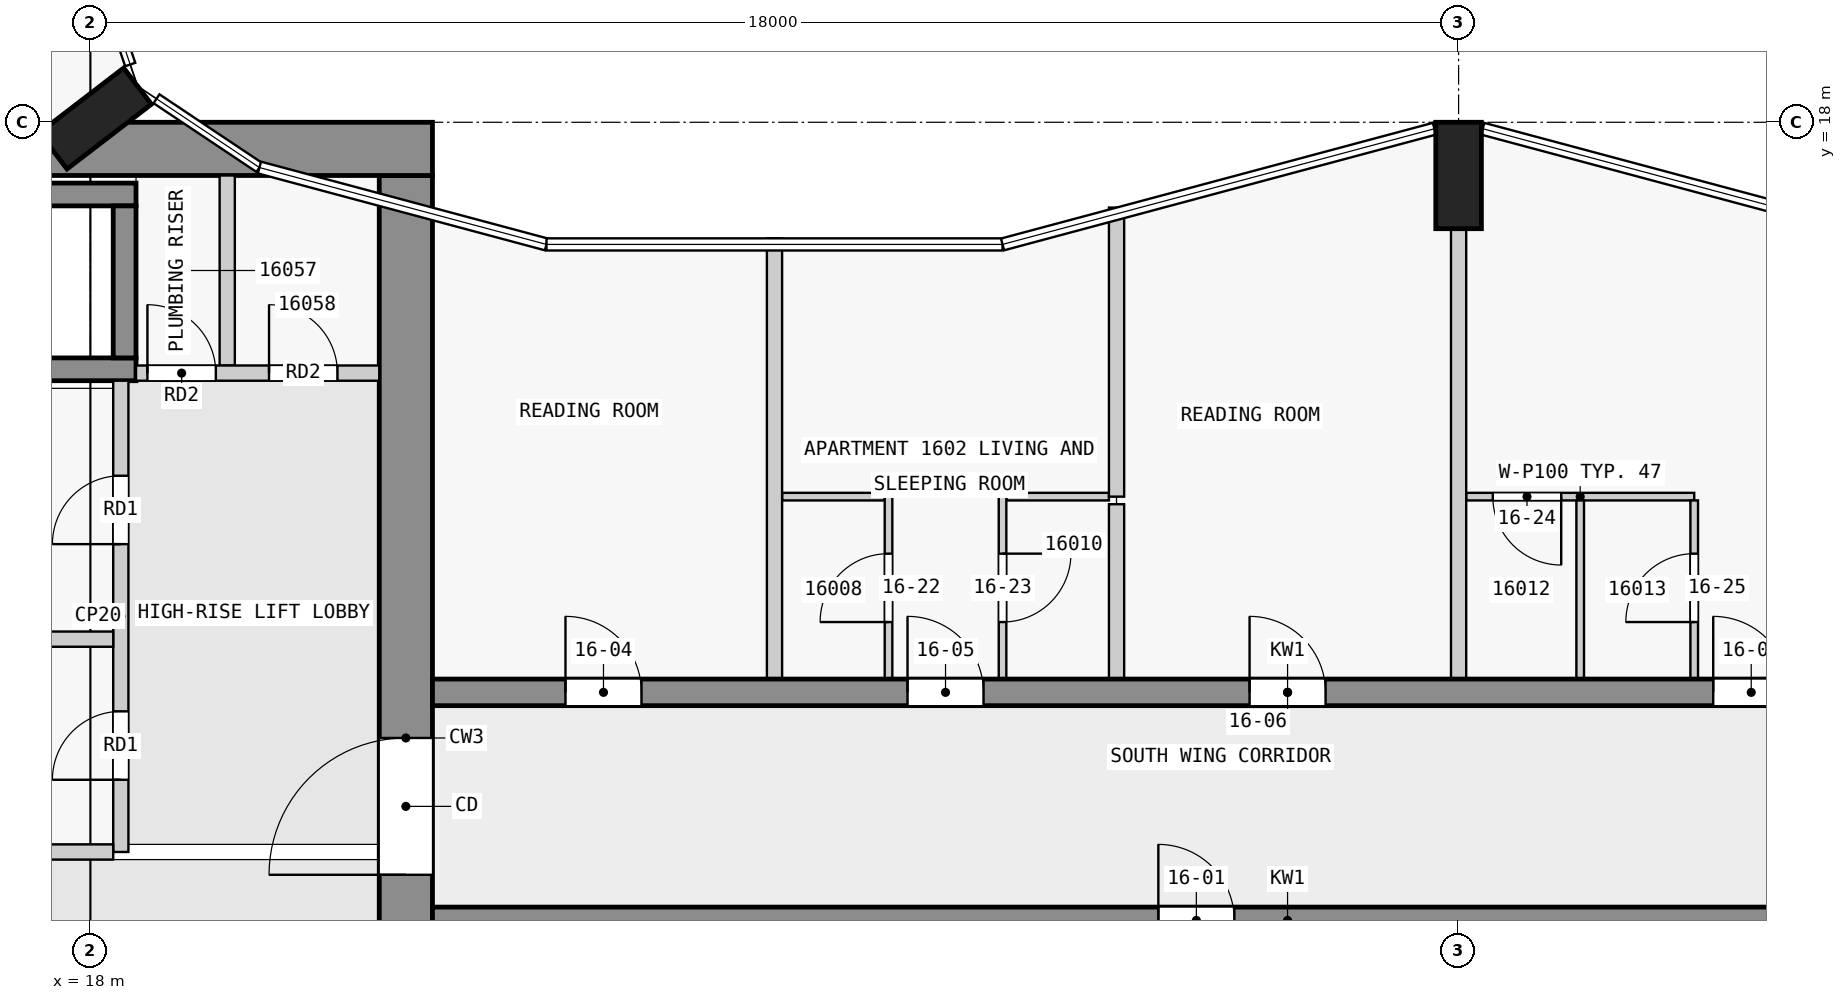
"""IFC4 building model, lengths in metres.
Left out: names, types, materials, properties, quantities, classifications, styles, units other than length and angle.
Written with IfcOpenShell. Run it as: python <this file> out.ifc"""

import sys

from ifc_helpers import new_model, si_unit, direction, frame, frame_2d, origin, origin_2d, place, context, subcontext, project, spatial, rectangle, extrude, element, fill, save


model = new_model("IFC4")
c1 = context("Model", 3, precision=1e-05, world=origin(), true_north=direction((0.0, 1.0)))
c2 = subcontext(c1, "Body", "Model", "MODEL_VIEW")
j1 = project(units=[si_unit("LENGTHUNIT", "METRE"), si_unit("PLANEANGLEUNIT", "RADIAN")], contexts=[c1])
p1 = place(None, origin())
s1 = spatial("IfcSite", under=j1, at=p1, CompositionType="ELEMENT")
p2 = place(p1, origin())
s2 = spatial("IfcBuilding", under=s1, at=p2, CompositionType="ELEMENT")
p3 = place(p2, frame((0.0, 0.0, 65.3)))
s3 = spatial("IfcBuildingStorey", under=s2, at=p3, CompositionType="ELEMENT", Elevation=65.3)
for number, where, z_axis, x_axis in (
    (1, (36.0, 17.3, 0.0), (0.0, 0.0, 1.0), (1.0, 0.0, 0.0)),
    (2, (18.065, 18.05, 0.0), (0.0, 0.0, 1.0), (-0.609, 0.793, 0.0)),
):
    element("IfcColumn", number, at=place(p3, frame(where, z_axis=z_axis, x_axis=x_axis)), inside=s3, PredefinedType="COLUMN", context=c2, shape_type="SweptSolid", body=[
        extrude(rectangle(XDim=0.6, YDim=1.4, at=origin_2d()), origin(), (0.0, 0.0, 1.0), 3.5),
    ])
p4 = place(p3, frame((1.6, 17.65, 0.0), z_axis=(0.0, 0.0, 1.0), x_axis=(1.0, 0.0, 0.0)))
e3 = element("IfcWall", 3, at=p4, inside=s3, PredefinedType="SHEAR", context=c2, shape_type="SweptSolid", body=[
    extrude(rectangle(XDim=20.9, YDim=0.7, at=frame_2d((10.45, 0.0))), origin(), (0.0, 0.0, 1.0), 3.25),
])
p5 = place(p4, frame((6.5, 0.0, 0.0)))
e4 = element("IfcOpeningElement", 4, at=p5, cuts=e3, PredefinedType="OPENING", context=c2, shape_type="SweptSolid", body=[
    extrude(rectangle(XDim=1.8, YDim=2.1, at=frame_2d((0.9, 1.05))), frame((0.0, 0.36, 0.0), z_axis=(0.0, -1.0, 0.0), x_axis=(1.0, 0.0, 0.0)), (0.0, 0.0, 1.0), 0.72),
])
p6 = place(p3, frame((22.15, 2.5, 0.0), z_axis=(0.0, 0.0, 1.0), x_axis=(0.0, 1.0, 0.0)))
e5 = element("IfcWall", 5, at=p6, inside=s3, PredefinedType="SHEAR", context=c2, shape_type="SweptSolid", body=[
    extrude(rectangle(XDim=14.8, YDim=0.7, at=frame_2d((7.4, 0.0))), origin(), (0.0, 0.0, 1.0), 3.25),
])
p7 = place(p6, frame((5.6, 0.0, 0.0)))
e6 = element("IfcOpeningElement", 6, at=p7, cuts=e5, PredefinedType="OPENING", context=c2, shape_type="SweptSolid", body=[
    extrude(rectangle(XDim=1.8, YDim=2.1, at=frame_2d((0.9, 1.05))), frame((0.0, 0.36, 0.0), z_axis=(0.0, -1.0, 0.0), x_axis=(1.0, 0.0, 0.0)), (0.0, 0.0, 1.0), 0.72),
])
for number, where, z_axis, x_axis in (
    (7, (10.8, 17.05, 0.0), (0.0, 0.0, 1.0), (1.0, 0.0, 0.0)),
    (8, (10.8, 14.75, 0.0), (0.0, 0.0, 1.0), (1.0, 0.0, 0.0)),
):
    element("IfcWall", number, at=place(p3, frame(where, z_axis=z_axis, x_axis=x_axis)), inside=s3, PredefinedType="SHEAR", context=c2, shape_type="SweptSolid", body=[
        extrude(rectangle(XDim=7.8, YDim=0.3, at=frame_2d((3.9, 0.0))), origin(), (0.0, 0.0, 1.0), 3.25),
    ])
p8 = place(p3, frame((18.45, 14.9, 0.0), z_axis=(0.0, 0.0, 1.0), x_axis=(0.0, 1.0, 0.0)))
e9 = element("IfcWall", 9, at=p8, inside=s3, PredefinedType="SHEAR", context=c2, shape_type="SweptSolid", body=[
    extrude(rectangle(XDim=2.0, YDim=0.3, at=frame_2d((1.0, 0.0))), origin(), (0.0, 0.0, 1.0), 3.25),
])
p9 = place(p3, frame((22.5, 7.5, 0.0), z_axis=(0.0, 0.0, 1.0), x_axis=(1.0, 0.0, 0.0)))
e10 = element("IfcWall", 10, at=p9, inside=s3, PredefinedType="SHEAR", context=c2, shape_type="SweptSolid", body=[
    extrude(rectangle(XDim=22.5, YDim=0.35, at=frame_2d((11.25, 0.0))), origin(), (0.0, 0.0, 1.0), 3.25),
])
p10 = place(p9, frame((9.55, 0.0, 0.0)))
e11 = element("IfcOpeningElement", 11, at=p10, cuts=e10, PredefinedType="OPENING", context=c2, shape_type="SweptSolid", body=[
    extrude(rectangle(XDim=1.0, YDim=2.1, at=frame_2d((0.5, 1.05))), frame((0.0, 0.185, 0.0), z_axis=(0.0, -1.0, 0.0), x_axis=(1.0, 0.0, 0.0)), (0.0, 0.0, 1.0), 0.37),
])
p11 = place(p9, frame((18.75, 0.0, 0.0)))
e12 = element("IfcOpeningElement", 12, at=p11, cuts=e10, PredefinedType="OPENING", context=c2, shape_type="SweptSolid", body=[
    extrude(rectangle(XDim=0.9, YDim=2.1, at=frame_2d((0.45, 1.05))), frame((0.0, 0.185, 0.0), z_axis=(0.0, -1.0, 0.0), x_axis=(1.0, 0.0, 0.0)), (0.0, 0.0, 1.0), 0.37),
])
p12 = place(p9, frame((20.95, 0.0, 0.0)))
e13 = element("IfcOpeningElement", 13, at=p12, cuts=e10, PredefinedType="OPENING", context=c2, shape_type="SweptSolid", body=[
    extrude(rectangle(XDim=1.0, YDim=2.1, at=frame_2d((0.5, 1.05))), frame((0.0, 0.185, 0.0), z_axis=(0.0, -1.0, 0.0), x_axis=(1.0, 0.0, 0.0)), (0.0, 0.0, 1.0), 0.37),
])
p13 = place(p3, frame((22.5, 10.5, 0.0), z_axis=(0.0, 0.0, 1.0), x_axis=(1.0, 0.0, 0.0)))
e14 = element("IfcWall", 14, at=p13, inside=s3, PredefinedType="SHEAR", context=c2, shape_type="SweptSolid", body=[
    extrude(rectangle(XDim=22.5, YDim=0.35, at=frame_2d((11.25, 0.0))), origin(), (0.0, 0.0, 1.0), 3.25),
])
p14 = place(p13, frame((1.75, 0.0, 0.0)))
e15 = element("IfcOpeningElement", 15, at=p14, cuts=e14, PredefinedType="OPENING", context=c2, shape_type="SweptSolid", body=[
    extrude(rectangle(XDim=1.0, YDim=2.1, at=frame_2d((0.5, 1.05))), frame((0.0, 0.185, 0.0), z_axis=(0.0, -1.0, 0.0), x_axis=(1.0, 0.0, 0.0)), (0.0, 0.0, 1.0), 0.37),
])
p15 = place(p13, frame((6.25, 0.0, 0.0)))
e16 = element("IfcOpeningElement", 16, at=p15, cuts=e14, PredefinedType="OPENING", context=c2, shape_type="SweptSolid", body=[
    extrude(rectangle(XDim=1.0, YDim=2.1, at=frame_2d((0.5, 1.05))), frame((0.0, 0.185, 0.0), z_axis=(0.0, -1.0, 0.0), x_axis=(1.0, 0.0, 0.0)), (0.0, 0.0, 1.0), 0.37),
])
p16 = place(p13, frame((10.75, 0.0, 0.0)))
e17 = element("IfcOpeningElement", 17, at=p16, cuts=e14, PredefinedType="OPENING", context=c2, shape_type="SweptSolid", body=[
    extrude(rectangle(XDim=1.0, YDim=2.1, at=frame_2d((0.5, 1.05))), frame((0.0, 0.185, 0.0), z_axis=(0.0, -1.0, 0.0), x_axis=(1.0, 0.0, 0.0)), (0.0, 0.0, 1.0), 0.37),
])
p17 = place(p13, frame((16.85, 0.0, 0.0)))
e18 = element("IfcOpeningElement", 18, at=p17, cuts=e14, PredefinedType="OPENING", context=c2, shape_type="SweptSolid", body=[
    extrude(rectangle(XDim=1.0, YDim=2.1, at=frame_2d((0.5, 1.05))), frame((0.0, 0.185, 0.0), z_axis=(0.0, -1.0, 0.0), x_axis=(1.0, 0.0, 0.0)), (0.0, 0.0, 1.0), 0.37),
])
p18 = place(p3, frame((10.9, 8.4, 0.0), z_axis=(0.0, 0.0, 1.0), x_axis=(1.0, 0.0, 0.0)))
e19 = element("IfcWall", 19, at=p18, inside=s3, PredefinedType="PARTITIONING", context=c2, shape_type="SweptSolid", body=[
    extrude(rectangle(XDim=7.4, YDim=0.2, at=frame_2d((3.7, 0.0))), origin(), (0.0, 0.0, 1.0), 3.25),
])
p19 = place(p3, frame((18.4, 8.4, 0.0), z_axis=(0.0, 0.0, 1.0), x_axis=(0.0, 1.0, 0.0)))
e20 = element("IfcWall", 20, at=p19, inside=s3, PredefinedType="PARTITIONING", context=c2, shape_type="SweptSolid", body=[
    extrude(rectangle(XDim=6.2, YDim=0.2, at=frame_2d((3.1, 0.0))), origin(), (0.0, 0.0, 1.0), 3.25),
])
p20 = place(p19, frame((0.95, 0.0, 0.0)))
e21 = element("IfcOpeningElement", 21, at=p20, cuts=e20, PredefinedType="OPENING", context=c2, shape_type="SweptSolid", body=[
    extrude(rectangle(XDim=0.9, YDim=2.1, at=frame_2d((0.45, 1.05))), frame((0.0, 0.11, 0.0), z_axis=(0.0, -1.0, 0.0), x_axis=(1.0, 0.0, 0.0)), (0.0, 0.0, 1.0), 0.22),
])
p21 = place(p19, frame((4.05, 0.0, 0.0)))
e22 = element("IfcOpeningElement", 22, at=p21, cuts=e20, PredefinedType="OPENING", context=c2, shape_type="SweptSolid", body=[
    extrude(rectangle(XDim=0.9, YDim=2.1, at=frame_2d((0.45, 1.05))), frame((0.0, 0.11, 0.0), z_axis=(0.0, -1.0, 0.0), x_axis=(1.0, 0.0, 0.0)), (0.0, 0.0, 1.0), 0.22),
])
p22 = place(p3, frame((10.9, 11.2, 0.0), z_axis=(0.0, 0.0, 1.0), x_axis=(1.0, 0.0, 0.0)))
e23 = element("IfcWall", 23, at=p22, inside=s3, PredefinedType="PARTITIONING", context=c2, shape_type="SweptSolid", body=[
    extrude(rectangle(XDim=7.4, YDim=0.2, at=frame_2d((3.7, 0.0))), origin(), (0.0, 0.0, 1.0), 3.25),
])
p23 = place(p3, frame((18.6, 14.7, 0.0), z_axis=(0.0, 0.0, 1.0), x_axis=(1.0, 0.0, 0.0)))
e24 = element("IfcWall", 24, at=p23, inside=s3, PredefinedType="PARTITIONING", context=c2, shape_type="SweptSolid", body=[
    extrude(rectangle(XDim=3.2, YDim=0.2, at=frame_2d((1.6, 0.0))), origin(), (0.0, 0.0, 1.0), 3.25),
])
p24 = place(p23, frame((0.15, 0.0, 0.0)))
e25 = element("IfcOpeningElement", 25, at=p24, cuts=e24, PredefinedType="OPENING", context=c2, shape_type="SweptSolid", body=[
    extrude(rectangle(XDim=0.9, YDim=2.1, at=frame_2d((0.45, 1.05))), frame((0.0, 0.11, 0.0), z_axis=(0.0, -1.0, 0.0), x_axis=(1.0, 0.0, 0.0)), (0.0, 0.0, 1.0), 0.22),
])
p25 = place(p23, frame((1.75, 0.0, 0.0)))
e26 = element("IfcOpeningElement", 26, at=p25, cuts=e24, PredefinedType="OPENING", context=c2, shape_type="SweptSolid", body=[
    extrude(rectangle(XDim=0.9, YDim=2.1, at=frame_2d((0.45, 1.05))), frame((0.0, 0.11, 0.0), z_axis=(0.0, -1.0, 0.0), x_axis=(1.0, 0.0, 0.0)), (0.0, 0.0, 1.0), 0.22),
])
p26 = place(p3, frame((19.8, 14.8, 0.0), z_axis=(0.0, 0.0, 1.0), x_axis=(0.0, 1.0, 0.0)))
e27 = element("IfcWall", 27, at=p26, inside=s3, PredefinedType="PARTITIONING", context=c2, shape_type="SweptSolid", body=[
    extrude(rectangle(XDim=2.5, YDim=0.2, at=frame_2d((1.25, 0.0))), origin(), (0.0, 0.0, 1.0), 3.25),
])
for number, where, z_axis, x_axis in (
    (28, (28.45, 13.075, 0.0), (0.0, 0.0, 1.0), (-1.0, 0.0, 0.0)),
    (29, (31.4, 13.075, 0.0), (0.0, 0.0, 1.0), (-1.0, 0.0, 0.0)),
):
    element("IfcWall", number, at=place(p3, frame(where, z_axis=z_axis, x_axis=x_axis)), inside=s3, PredefinedType="PARTITIONING", context=c2, shape_type="SweptSolid", body=[
        extrude(rectangle(XDim=1.35, YDim=0.1, at=frame_2d((0.675, 0.0))), origin(), (0.0, 0.0, 1.0), 3.25),
    ])
p27 = place(p3, frame((39.1, 13.075, 0.0), z_axis=(0.0, 0.0, 1.0), x_axis=(-1.0, 0.0, 0.0)))
e30 = element("IfcWall", 30, at=p27, inside=s3, PredefinedType="PARTITIONING", context=c2, shape_type="SweptSolid", body=[
    extrude(rectangle(XDim=3.0, YDim=0.1, at=frame_2d((1.5, 0.0))), origin(), (0.0, 0.0, 1.0), 3.25),
])
p28 = place(p27, frame((1.75, 0.0, 0.0)))
e31 = element("IfcOpeningElement", 31, at=p28, cuts=e30, PredefinedType="OPENING", context=c2, shape_type="SweptSolid", body=[
    extrude(rectangle(XDim=0.9, YDim=2.1, at=frame_2d((0.45, 1.05))), frame((0.0, 0.06, 0.0), z_axis=(0.0, -1.0, 0.0), x_axis=(1.0, 0.0, 0.0)), (0.0, 0.0, 1.0), 0.12),
])
p29 = place(p3, frame((27.0, 10.675, 0.0), z_axis=(0.0, 0.0, 1.0), x_axis=(0.0, 1.0, 0.0)))
e32 = element("IfcWall", 32, at=p29, inside=s3, PredefinedType="PARTITIONING", context=c2, shape_type="SweptSolid", body=[
    extrude(rectangle(XDim=5.798, YDim=0.2, at=frame_2d((2.899, 0.0))), origin(), (0.0, 0.0, 1.0), 3.25),
])
p30 = place(p3, frame((28.5, 10.675, 0.0), z_axis=(0.0, 0.0, 1.0), x_axis=(0.0, 1.0, 0.0)))
e33 = element("IfcWall", 33, at=p30, inside=s3, PredefinedType="PARTITIONING", context=c2, shape_type="SweptSolid", body=[
    extrude(rectangle(XDim=2.4, YDim=0.1, at=frame_2d((1.2, 0.0))), origin(), (0.0, 0.0, 1.0), 3.25),
])
p31 = place(p30, frame((0.75, 0.0, 0.0)))
e34 = element("IfcOpeningElement", 34, at=p31, cuts=e33, PredefinedType="OPENING", context=c2, shape_type="SweptSolid", body=[
    extrude(rectangle(XDim=0.9, YDim=2.1, at=frame_2d((0.45, 1.05))), frame((0.0, 0.06, 0.0), z_axis=(0.0, -1.0, 0.0), x_axis=(1.0, 0.0, 0.0)), (0.0, 0.0, 1.0), 0.12),
])
p32 = place(p3, frame((30.0, 13.075, 0.0), z_axis=(0.0, 0.0, 1.0), x_axis=(0.0, -1.0, 0.0)))
e35 = element("IfcWall", 35, at=p32, inside=s3, PredefinedType="PARTITIONING", context=c2, shape_type="SweptSolid", body=[
    extrude(rectangle(XDim=2.4, YDim=0.1, at=frame_2d((1.2, 0.0))), origin(), (0.0, 0.0, 1.0), 3.25),
])
p33 = place(p32, frame((0.75, 0.0, 0.0)))
e36 = element("IfcOpeningElement", 36, at=p33, cuts=e35, PredefinedType="OPENING", context=c2, shape_type="SweptSolid", body=[
    extrude(rectangle(XDim=0.9, YDim=2.1, at=frame_2d((0.45, 1.05))), frame((0.0, 0.06, 0.0), z_axis=(0.0, -1.0, 0.0), x_axis=(1.0, 0.0, 0.0)), (0.0, 0.0, 1.0), 0.12),
])
p34 = place(p3, frame((31.5, 16.878, 0.0), z_axis=(0.0, 0.0, 1.0), x_axis=(0.0, -1.0, 0.0)))
e37 = element("IfcWall", 37, at=p34, inside=s3, PredefinedType="PARTITIONING", context=c2, shape_type="SweptSolid", body=[
    extrude(rectangle(XDim=3.803, YDim=0.2, at=frame_2d((1.901, 0.0))), origin(), (0.0, 0.0, 1.0), 3.25),
])
p35 = place(p3, frame((31.5, 10.675, 0.0), z_axis=(0.0, 0.0, 1.0), x_axis=(0.0, 1.0, 0.0)))
e38 = element("IfcWall", 38, at=p35, inside=s3, PredefinedType="PARTITIONING", context=c2, shape_type="SweptSolid", body=[
    extrude(rectangle(XDim=2.3, YDim=0.2, at=frame_2d((1.15, 0.0))), origin(), (0.0, 0.0, 1.0), 3.25),
])
p36 = place(p3, frame((36.0, 10.675, 0.0), z_axis=(0.0, 0.0, 1.0), x_axis=(0.0, 1.0, 0.0)))
e39 = element("IfcWall", 39, at=p36, inside=s3, PredefinedType="PARTITIONING", context=c2, shape_type="SweptSolid", body=[
    extrude(rectangle(XDim=5.925, YDim=0.2, at=frame_2d((2.962, 0.0))), origin(), (0.0, 0.0, 1.0), 3.25),
])
p37 = place(p3, frame((37.6, 10.675, 0.0), z_axis=(0.0, 0.0, 1.0), x_axis=(0.0, 1.0, 0.0)))
e40 = element("IfcWall", 40, at=p37, inside=s3, PredefinedType="PARTITIONING", context=c2, shape_type="SweptSolid", body=[
    extrude(rectangle(XDim=2.35, YDim=0.1, at=frame_2d((1.175, 0.0))), origin(), (0.0, 0.0, 1.0), 3.25),
])
p38 = place(p3, frame((39.1, 10.675, 0.0), z_axis=(0.0, 0.0, 1.0), x_axis=(0.0, 1.0, 0.0)))
e41 = element("IfcWall", 41, at=p38, inside=s3, PredefinedType="PARTITIONING", context=c2, shape_type="SweptSolid", body=[
    extrude(rectangle(XDim=2.35, YDim=0.1, at=frame_2d((1.175, 0.0))), origin(), (0.0, 0.0, 1.0), 3.25),
])
p39 = place(p38, frame((0.75, 0.0, 0.0)))
e42 = element("IfcOpeningElement", 42, at=p39, cuts=e41, PredefinedType="OPENING", context=c2, shape_type="SweptSolid", body=[
    extrude(rectangle(XDim=0.9, YDim=2.1, at=frame_2d((0.45, 1.05))), frame((0.0, 0.06, 0.0), z_axis=(0.0, -1.0, 0.0), x_axis=(1.0, 0.0, 0.0)), (0.0, 0.0, 1.0), 0.12),
])
p40 = place(p20, origin())
e43 = element("IfcDoor", 43, at=p40, inside=s3, OperationType="SINGLE_SWING_LEFT", PredefinedType="DOOR", context=c2, shape_type="SweptSolid", body=[
    extrude(rectangle(XDim=0.9, YDim=2.1, at=frame_2d((0.45, 1.05))), frame((0.0, 0.025, 0.0), z_axis=(0.0, -1.0, 0.0), x_axis=(1.0, 0.0, 0.0)), (0.0, 0.0, 1.0), 0.05),
])
fill(e21, e43)
p41 = place(p21, origin())
e44 = element("IfcDoor", 44, at=p41, inside=s3, OperationType="SINGLE_SWING_LEFT", PredefinedType="DOOR", context=c2, shape_type="SweptSolid", body=[
    extrude(rectangle(XDim=0.9, YDim=2.1, at=frame_2d((0.45, 1.05))), frame((0.0, 0.025, 0.0), z_axis=(0.0, -1.0, 0.0), x_axis=(1.0, 0.0, 0.0)), (0.0, 0.0, 1.0), 0.05),
])
fill(e22, e44)
p42 = place(p7, origin())
e45 = element("IfcDoor", 45, at=p42, inside=s3, OperationType="DOUBLE_DOOR_SINGLE_SWING", PredefinedType="DOOR", context=c2, shape_type="SweptSolid", body=[
    extrude(rectangle(XDim=1.8, YDim=2.1, at=frame_2d((0.9, 1.05))), frame((0.0, 0.025, 0.0), z_axis=(0.0, -1.0, 0.0), x_axis=(1.0, 0.0, 0.0)), (0.0, 0.0, 1.0), 0.05),
])
fill(e6, e45)
p43 = place(p24, origin())
e46 = element("IfcDoor", 46, at=p43, inside=s3, OperationType="SINGLE_SWING_LEFT", PredefinedType="DOOR", context=c2, shape_type="SweptSolid", body=[
    extrude(rectangle(XDim=0.9, YDim=2.1, at=frame_2d((0.45, 1.05))), frame((0.0, 0.025, 0.0), z_axis=(0.0, -1.0, 0.0), x_axis=(1.0, 0.0, 0.0)), (0.0, 0.0, 1.0), 0.05),
])
fill(e25, e46)
p44 = place(p25, origin())
e47 = element("IfcDoor", 47, at=p44, inside=s3, OperationType="SINGLE_SWING_LEFT", PredefinedType="DOOR", context=c2, shape_type="SweptSolid", body=[
    extrude(rectangle(XDim=0.9, YDim=2.1, at=frame_2d((0.45, 1.05))), frame((0.0, 0.025, 0.0), z_axis=(0.0, -1.0, 0.0), x_axis=(1.0, 0.0, 0.0)), (0.0, 0.0, 1.0), 0.05),
])
fill(e26, e47)
p45 = place(p10, origin())
e48 = element("IfcDoor", 48, at=p45, inside=s3, OperationType="SINGLE_SWING_LEFT", PredefinedType="DOOR", context=c2, shape_type="SweptSolid", body=[
    extrude(rectangle(XDim=1.0, YDim=2.1, at=frame_2d((0.5, 1.05))), frame((0.0, 0.025, 0.0), z_axis=(0.0, -1.0, 0.0), x_axis=(1.0, 0.0, 0.0)), (0.0, 0.0, 1.0), 0.05),
])
fill(e11, e48)
p46 = place(p14, origin())
e49 = element("IfcDoor", 49, at=p46, inside=s3, OperationType="SINGLE_SWING_LEFT", PredefinedType="DOOR", context=c2, shape_type="SweptSolid", body=[
    extrude(rectangle(XDim=1.0, YDim=2.1, at=frame_2d((0.5, 1.05))), frame((0.0, 0.025, 0.0), z_axis=(0.0, -1.0, 0.0), x_axis=(1.0, 0.0, 0.0)), (0.0, 0.0, 1.0), 0.05),
])
fill(e15, e49)
p47 = place(p15, origin())
e50 = element("IfcDoor", 50, at=p47, inside=s3, OperationType="SINGLE_SWING_LEFT", PredefinedType="DOOR", context=c2, shape_type="SweptSolid", body=[
    extrude(rectangle(XDim=1.0, YDim=2.1, at=frame_2d((0.5, 1.05))), frame((0.0, 0.025, 0.0), z_axis=(0.0, -1.0, 0.0), x_axis=(1.0, 0.0, 0.0)), (0.0, 0.0, 1.0), 0.05),
])
fill(e16, e50)
p48 = place(p16, origin())
e51 = element("IfcDoor", 51, at=p48, inside=s3, OperationType="SINGLE_SWING_LEFT", PredefinedType="DOOR", context=c2, shape_type="SweptSolid", body=[
    extrude(rectangle(XDim=1.0, YDim=2.1, at=frame_2d((0.5, 1.05))), frame((0.0, 0.025, 0.0), z_axis=(0.0, -1.0, 0.0), x_axis=(1.0, 0.0, 0.0)), (0.0, 0.0, 1.0), 0.05),
])
fill(e17, e51)
p49 = place(p17, origin())
e52 = element("IfcDoor", 52, at=p49, inside=s3, OperationType="SINGLE_SWING_RIGHT", PredefinedType="DOOR", context=c2, shape_type="SweptSolid", body=[
    extrude(rectangle(XDim=1.0, YDim=2.1, at=frame_2d((0.5, 1.05))), frame((0.0, 0.025, 0.0), z_axis=(0.0, -1.0, 0.0), x_axis=(1.0, 0.0, 0.0)), (0.0, 0.0, 1.0), 0.05),
])
fill(e18, e52)
p50 = place(p31, origin())
e53 = element("IfcDoor", 53, at=p50, inside=s3, OperationType="SINGLE_SWING_RIGHT", PredefinedType="DOOR", context=c2, shape_type="SweptSolid", body=[
    extrude(rectangle(XDim=0.9, YDim=2.1, at=frame_2d((0.45, 1.05))), frame((0.0, 0.025, 0.0), z_axis=(0.0, -1.0, 0.0), x_axis=(1.0, 0.0, 0.0)), (0.0, 0.0, 1.0), 0.05),
])
fill(e34, e53)
p51 = place(p33, origin())
e54 = element("IfcDoor", 54, at=p51, inside=s3, OperationType="SINGLE_SWING_RIGHT", PredefinedType="DOOR", context=c2, shape_type="SweptSolid", body=[
    extrude(rectangle(XDim=0.9, YDim=2.1, at=frame_2d((0.45, 1.05))), frame((0.0, 0.025, 0.0), z_axis=(0.0, -1.0, 0.0), x_axis=(1.0, 0.0, 0.0)), (0.0, 0.0, 1.0), 0.05),
])
fill(e36, e54)
p52 = place(p28, origin())
e55 = element("IfcDoor", 55, at=p52, inside=s3, OperationType="SINGLE_SWING_RIGHT", PredefinedType="DOOR", context=c2, shape_type="SweptSolid", body=[
    extrude(rectangle(XDim=0.9, YDim=2.1, at=frame_2d((0.45, 1.05))), frame((0.0, 0.025, 0.0), z_axis=(0.0, -1.0, 0.0), x_axis=(1.0, 0.0, 0.0)), (0.0, 0.0, 1.0), 0.05),
])
fill(e31, e55)
p53 = place(p39, origin())
e56 = element("IfcDoor", 56, at=p53, inside=s3, OperationType="SINGLE_SWING_RIGHT", PredefinedType="DOOR", context=c2, shape_type="SweptSolid", body=[
    extrude(rectangle(XDim=0.9, YDim=2.1, at=frame_2d((0.45, 1.05))), frame((0.0, 0.025, 0.0), z_axis=(0.0, -1.0, 0.0), x_axis=(1.0, 0.0, 0.0)), (0.0, 0.0, 1.0), 0.05),
])
fill(e42, e56)
save(model, sys.argv[1])
